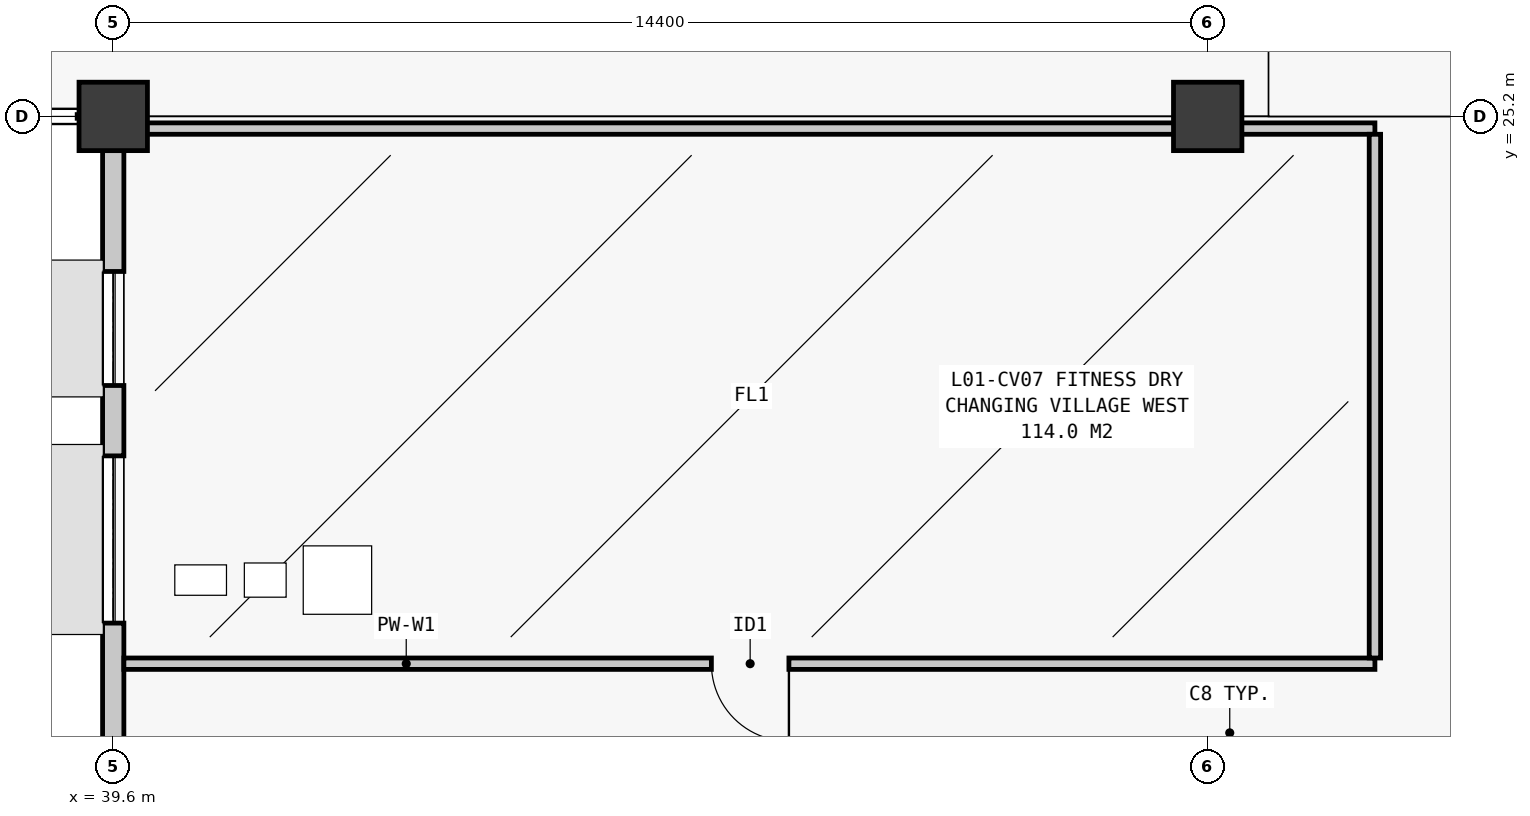
"""IFC4 building model, lengths in metres.
Left out: names, types, materials, properties, quantities, classifications, styles, units other than length and angle.
Written with IfcOpenShell. Run it as: python <this file> out.ifc"""

import sys

from ifc_helpers import new_model, si_unit, direction, frame, frame_2d, origin, origin_2d, place, context, subcontext, project, spatial, rectangle, extrude, element, fill, save


model = new_model("IFC4")
c1 = context("Model", 3, precision=1e-05, world=origin(), true_north=direction((0.0, 1.0)))
c2 = subcontext(c1, "Body", "Model", "MODEL_VIEW")
j1 = project(units=[si_unit("LENGTHUNIT", "METRE"), si_unit("PLANEANGLEUNIT", "RADIAN")], contexts=[c1])
p1 = place(None, origin())
s1 = spatial("IfcSite", under=j1, at=p1, CompositionType="ELEMENT")
p2 = place(p1, origin())
s2 = spatial("IfcBuilding", under=s1, at=p2, CompositionType="ELEMENT")
p3 = place(p2, frame((0.0, 0.0, 4.8)))
s3 = spatial("IfcBuildingStorey", under=s2, at=p3, CompositionType="ELEMENT", Elevation=4.8)
for number, where, z_axis, x_axis in (
    (1, (39.6, 25.2, 0.0), (0.0, 0.0, 1.0), (1.0, 0.0, 0.0)),
    (2, (54.0, 25.2, 0.0), (0.0, 0.0, 1.0), (1.0, 0.0, 0.0)),
):
    element("IfcColumn", number, at=place(p3, frame(where, z_axis=z_axis, x_axis=x_axis)), inside=s3, PredefinedType="COLUMN", context=c2, shape_type="SweptSolid", body=[
        extrude(rectangle(XDim=0.9, YDim=0.9, at=origin_2d()), origin(), (0.0, 0.0, 1.0), 4.2),
    ])
p4 = place(p3, frame((39.6, 24.75, 0.0), z_axis=(0.0, 0.0, 1.0), x_axis=(0.0, -1.0, 0.0)))
e3 = element("IfcWall", 3, at=p4, inside=s3, PredefinedType="STANDARD", context=c2, shape_type="SweptSolid", body=[
    extrude(rectangle(XDim=7.8, YDim=0.28, at=frame_2d((3.9, 0.0))), origin(), (0.0, 0.0, 1.0), 3.436),
])
p5 = place(p4, frame((1.59, 0.0, 1.05)))
e4 = element("IfcOpeningElement", 4, at=p5, cuts=e3, PredefinedType="OPENING", context=c2, shape_type="SweptSolid", body=[
    extrude(rectangle(XDim=1.5, YDim=1.5, at=frame_2d((0.75, 0.75))), frame((0.0, 0.155, 0.0), z_axis=(0.0, -1.0, 0.0), x_axis=(1.0, 0.0, 0.0)), (0.0, 0.0, 1.0), 0.31),
])
p6 = place(p4, frame((4.016, 0.0, 0.95)))
e5 = element("IfcOpeningElement", 5, at=p6, cuts=e3, PredefinedType="OPENING", context=c2, shape_type="SweptSolid", body=[
    extrude(rectangle(XDim=2.2, YDim=1.65, at=frame_2d((1.1, 0.825))), frame((0.0, 0.155, 0.0), z_axis=(0.0, -1.0, 0.0), x_axis=(1.0, 0.0, 0.0)), (0.0, 0.0, 1.0), 0.31),
])
p7 = place(p3, frame((39.74, 18.0, 0.0), z_axis=(0.0, 0.0, 1.0), x_axis=(1.0, 0.0, 0.0)))
e6 = element("IfcWall", 6, at=p7, inside=s3, PredefinedType="PLUMBINGWALL", context=c2, shape_type="SweptSolid", body=[
    extrude(rectangle(XDim=16.46, YDim=0.15, at=frame_2d((8.23, 0.0))), origin(), (0.0, 0.0, 1.0), 3.94),
])
p8 = place(p7, frame((7.73, 0.0, 0.0)))
e7 = element("IfcOpeningElement", 7, at=p8, cuts=e6, PredefinedType="OPENING", context=c2, shape_type="SweptSolid", body=[
    extrude(rectangle(XDim=1.02, YDim=2.15, at=frame_2d((0.51, 1.075))), frame((0.0, 0.09, 0.0), z_axis=(0.0, -1.0, 0.0), x_axis=(1.0, 0.0, 0.0)), (0.0, 0.0, 1.0), 0.18),
])
p9 = place(p3, frame((39.74, 25.04, 0.0), z_axis=(0.0, 0.0, 1.0), x_axis=(1.0, 0.0, 0.0)))
e8 = element("IfcWall", 8, at=p9, inside=s3, PredefinedType="PLUMBINGWALL", context=c2, shape_type="SweptSolid", body=[
    extrude(rectangle(XDim=16.46, YDim=0.15, at=frame_2d((8.23, 0.0))), origin(), (0.0, 0.0, 1.0), 3.252),
])
p10 = place(p3, frame((56.2, 18.075, 0.0), z_axis=(0.0, 0.0, 1.0), x_axis=(0.0, 1.0, 0.0)))
e9 = element("IfcWall", 9, at=p10, inside=s3, PredefinedType="PLUMBINGWALL", context=c2, shape_type="SweptSolid", body=[
    extrude(rectangle(XDim=6.89, YDim=0.15, at=frame_2d((3.445, 0.0))), origin(), (0.0, 0.0, 1.0), 3.94),
])
p11 = place(p5, origin())
e10 = element("IfcWindow", 10, at=p11, inside=s3, PartitioningType="SINGLE_PANEL", PredefinedType="WINDOW", context=c2, shape_type="SweptSolid", body=[
    extrude(rectangle(XDim=1.5, YDim=1.5, at=frame_2d((0.75, 0.75))), frame((0.0, 0.03, 0.0), z_axis=(0.0, -1.0, 0.0), x_axis=(1.0, 0.0, 0.0)), (0.0, 0.0, 1.0), 0.06),
])
fill(e4, e10)
p12 = place(p6, origin())
e11 = element("IfcWindow", 11, at=p12, inside=s3, PartitioningType="SINGLE_PANEL", PredefinedType="WINDOW", context=c2, shape_type="SweptSolid", body=[
    extrude(rectangle(XDim=2.2, YDim=1.65, at=frame_2d((1.1, 0.825))), frame((0.0, 0.03, 0.0), z_axis=(0.0, -1.0, 0.0), x_axis=(1.0, 0.0, 0.0)), (0.0, 0.0, 1.0), 0.06),
])
fill(e5, e11)
p13 = place(p8, frame((1.02, 0.0, 0.0), z_axis=(0.0, 0.0, 1.0), x_axis=(-1.0, 0.0, 0.0)))
e12 = element("IfcDoor", 12, at=p13, inside=s3, OperationType="SINGLE_SWING_RIGHT", PredefinedType="DOOR", context=c2, shape_type="SweptSolid", body=[
    extrude(rectangle(XDim=1.02, YDim=2.15, at=frame_2d((0.51, 1.075))), frame((0.0, 0.025, 0.0), z_axis=(0.0, -1.0, 0.0), x_axis=(1.0, 0.0, 0.0)), (0.0, 0.0, 1.0), 0.05),
])
fill(e7, e12)
save(model, sys.argv[1])
